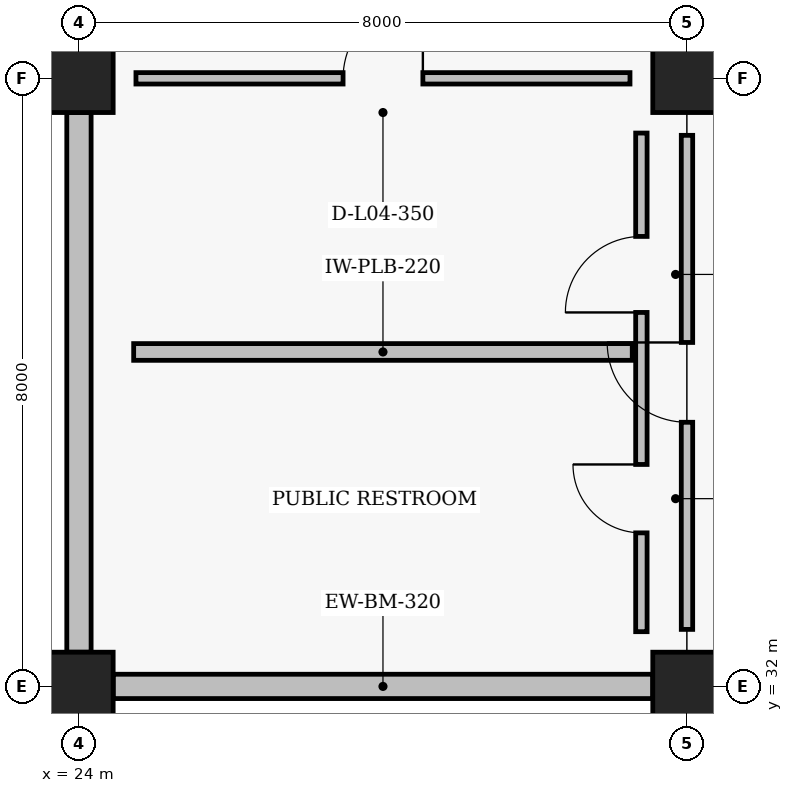
"""IFC4 building model, lengths in metres.
Left out: names, types, materials, properties, quantities, classifications, styles, units other than length and angle.
Written with IfcOpenShell. Run it as: python <this file> out.ifc"""

import sys

from ifc_helpers import new_model, si_unit, direction, frame, frame_2d, origin, origin_2d, place, context, subcontext, project, spatial, rectangle, extrude, element, fill, save


model = new_model("IFC4")
c1 = context("Model", 3, precision=1e-05, world=origin(), true_north=direction((0.0, 1.0)))
c2 = subcontext(c1, "Body", "Model", "MODEL_VIEW")
j1 = project(units=[si_unit("LENGTHUNIT", "METRE"), si_unit("PLANEANGLEUNIT", "RADIAN")], contexts=[c1])
p1 = place(None, origin())
s1 = spatial("IfcSite", under=j1, at=p1, CompositionType="ELEMENT")
p2 = place(p1, origin())
s2 = spatial("IfcBuilding", under=s1, at=p2, CompositionType="ELEMENT")
p3 = place(p2, frame((0.0, 0.0, 14.4)))
s3 = spatial("IfcBuildingStorey", under=s2, at=p3, CompositionType="ELEMENT", Elevation=14.4)
for number, where, z_axis, x_axis in (
    (1, (24.0, 32.0, 0.0), (0.0, 0.0, 1.0), (1.0, 0.0, 0.0)),
    (2, (24.0, 40.0, 0.0), (0.0, 0.0, 1.0), (1.0, 0.0, 0.0)),
    (3, (32.0, 32.0, 0.0), (0.0, 0.0, 1.0), (1.0, 0.0, 0.0)),
    (4, (32.0, 40.0, 0.0), (0.0, 0.0, 1.0), (1.0, 0.0, 0.0)),
):
    element("IfcColumn", number, at=place(p3, frame(where, z_axis=z_axis, x_axis=x_axis)), inside=s3, PredefinedType="COLUMN", context=c2, shape_type="SweptSolid", body=[
        extrude(rectangle(XDim=0.9, YDim=0.9, at=origin_2d()), origin(), (0.0, 0.0, 1.0), 4.2),
    ])
p4 = place(p3, frame((24.45, 32.0, 0.0), z_axis=(0.0, 0.0, 1.0), x_axis=(1.0, 0.0, 0.0)))
e5 = element("IfcWall", 5, at=p4, inside=s3, PredefinedType="SOLIDWALL", context=c2, shape_type="SweptSolid", body=[
    extrude(rectangle(XDim=7.1, YDim=0.32, at=frame_2d((3.55, 0.0))), origin(), (0.0, 0.0, 1.0), 3.35),
])
p5 = place(p3, frame((24.0, 32.45, 0.0), z_axis=(0.0, 0.0, 1.0), x_axis=(0.0, 1.0, 0.0)))
e6 = element("IfcWall", 6, at=p5, inside=s3, PredefinedType="SOLIDWALL", context=c2, shape_type="SweptSolid", body=[
    extrude(rectangle(XDim=7.1, YDim=0.32, at=frame_2d((3.55, 0.0))), origin(), (0.0, 0.0, 1.0), 3.33),
])
p6 = place(p3, frame((24.72, 36.4, 0.0), z_axis=(0.0, 0.0, 1.0), x_axis=(1.0, 0.0, 0.0)))
e7 = element("IfcWall", 7, at=p6, inside=s3, PredefinedType="PLUMBINGWALL", context=c2, shape_type="SweptSolid", body=[
    extrude(rectangle(XDim=6.56, YDim=0.22, at=frame_2d((3.28, 0.0))), origin(), (0.0, 0.0, 1.0), 3.62),
])
p7 = place(p3, frame((31.4, 32.72, 0.0), z_axis=(0.0, 0.0, 1.0), x_axis=(0.0, 1.0, 0.0)))
e8 = element("IfcWall", 8, at=p7, inside=s3, PredefinedType="PARTITIONING", context=c2, shape_type="SweptSolid", body=[
    extrude(rectangle(XDim=6.56, YDim=0.15, at=frame_2d((3.28, 0.0))), origin(), (0.0, 0.0, 1.0), 3.62),
])
p8 = place(p7, frame((1.3, 0.0, 0.0)))
e9 = element("IfcOpeningElement", 9, at=p8, cuts=e8, PredefinedType="OPENING", context=c2, shape_type="SweptSolid", body=[
    extrude(rectangle(XDim=0.9, YDim=2.1, at=frame_2d((0.45, 1.05))), frame((0.0, 0.085, 0.0), z_axis=(0.0, -1.0, 0.0), x_axis=(1.0, 0.0, 0.0)), (0.0, 0.0, 1.0), 0.17),
])
p9 = place(p7, frame((4.2, 0.0, 0.0)))
e10 = element("IfcOpeningElement", 10, at=p9, cuts=e8, PredefinedType="OPENING", context=c2, shape_type="SweptSolid", body=[
    extrude(rectangle(XDim=1.0, YDim=2.15, at=frame_2d((0.5, 1.075))), frame((0.0, 0.085, 0.0), z_axis=(0.0, -1.0, 0.0), x_axis=(1.0, 0.0, 0.0)), (0.0, 0.0, 1.0), 0.17),
])
p10 = place(p3, frame((24.75, 40.0, 0.0), z_axis=(0.0, 0.0, 1.0), x_axis=(1.0, 0.0, 0.0)))
e11 = element("IfcWall", 11, at=p10, inside=s3, PredefinedType="PARTITIONING", context=c2, shape_type="SweptSolid", body=[
    extrude(rectangle(XDim=6.5, YDim=0.15, at=frame_2d((3.25, 0.0))), origin(), (0.0, 0.0, 1.0), 3.43),
])
p11 = place(p10, frame((2.725, 0.0, 0.0)))
e12 = element("IfcOpeningElement", 12, at=p11, cuts=e11, PredefinedType="OPENING", context=c2, shape_type="SweptSolid", body=[
    extrude(rectangle(XDim=1.05, YDim=2.15, at=frame_2d((0.525, 1.075))), frame((0.0, 0.085, 0.0), z_axis=(0.0, -1.0, 0.0), x_axis=(1.0, 0.0, 0.0)), (0.0, 0.0, 1.0), 0.17),
])
p12 = place(p3, frame((32.0, 32.75, 0.0), z_axis=(0.0, 0.0, 1.0), x_axis=(0.0, 1.0, 0.0)))
e13 = element("IfcWall", 13, at=p12, inside=s3, PredefinedType="PARTITIONING", context=c2, shape_type="SweptSolid", body=[
    extrude(rectangle(XDim=6.5, YDim=0.15, at=frame_2d((3.25, 0.0))), origin(), (0.0, 0.0, 1.0), 3.37),
])
p13 = place(p12, frame((2.725, 0.0, 0.0)))
e14 = element("IfcOpeningElement", 14, at=p13, cuts=e13, PredefinedType="OPENING", context=c2, shape_type="SweptSolid", body=[
    extrude(rectangle(XDim=1.05, YDim=2.15, at=frame_2d((0.525, 1.075))), frame((0.0, 0.085, 0.0), z_axis=(0.0, -1.0, 0.0), x_axis=(1.0, 0.0, 0.0)), (0.0, 0.0, 1.0), 0.17),
])
p14 = place(p8, origin())
e15 = element("IfcDoor", 15, at=p14, inside=s3, OperationType="SINGLE_SWING_RIGHT", PredefinedType="DOOR", context=c2, shape_type="SweptSolid", body=[
    extrude(rectangle(XDim=0.9, YDim=2.1, at=frame_2d((0.45, 1.05))), frame((0.0, 0.025, 0.0), z_axis=(0.0, -1.0, 0.0), x_axis=(1.0, 0.0, 0.0)), (0.0, 0.0, 1.0), 0.05),
])
fill(e9, e15)
p15 = place(p9, origin())
e16 = element("IfcDoor", 16, at=p15, inside=s3, OperationType="SINGLE_SWING_LEFT", PredefinedType="DOOR", context=c2, shape_type="SweptSolid", body=[
    extrude(rectangle(XDim=1.0, YDim=2.15, at=frame_2d((0.5, 1.075))), frame((0.0, 0.025, 0.0), z_axis=(0.0, -1.0, 0.0), x_axis=(1.0, 0.0, 0.0)), (0.0, 0.0, 1.0), 0.05),
])
fill(e10, e16)
p16 = place(p11, origin())
e17 = element("IfcDoor", 17, at=p16, inside=s3, OperationType="SINGLE_SWING_RIGHT", PredefinedType="DOOR", context=c2, shape_type="SweptSolid", body=[
    extrude(rectangle(XDim=1.05, YDim=2.15, at=frame_2d((0.525, 1.075))), frame((0.0, 0.025, 0.0), z_axis=(0.0, -1.0, 0.0), x_axis=(1.0, 0.0, 0.0)), (0.0, 0.0, 1.0), 0.05),
])
fill(e12, e17)
p17 = place(p13, origin())
e18 = element("IfcDoor", 18, at=p17, inside=s3, OperationType="SINGLE_SWING_RIGHT", PredefinedType="DOOR", context=c2, shape_type="SweptSolid", body=[
    extrude(rectangle(XDim=1.05, YDim=2.15, at=frame_2d((0.525, 1.075))), frame((0.0, 0.025, 0.0), z_axis=(0.0, -1.0, 0.0), x_axis=(1.0, 0.0, 0.0)), (0.0, 0.0, 1.0), 0.05),
])
fill(e14, e18)
save(model, sys.argv[1])
